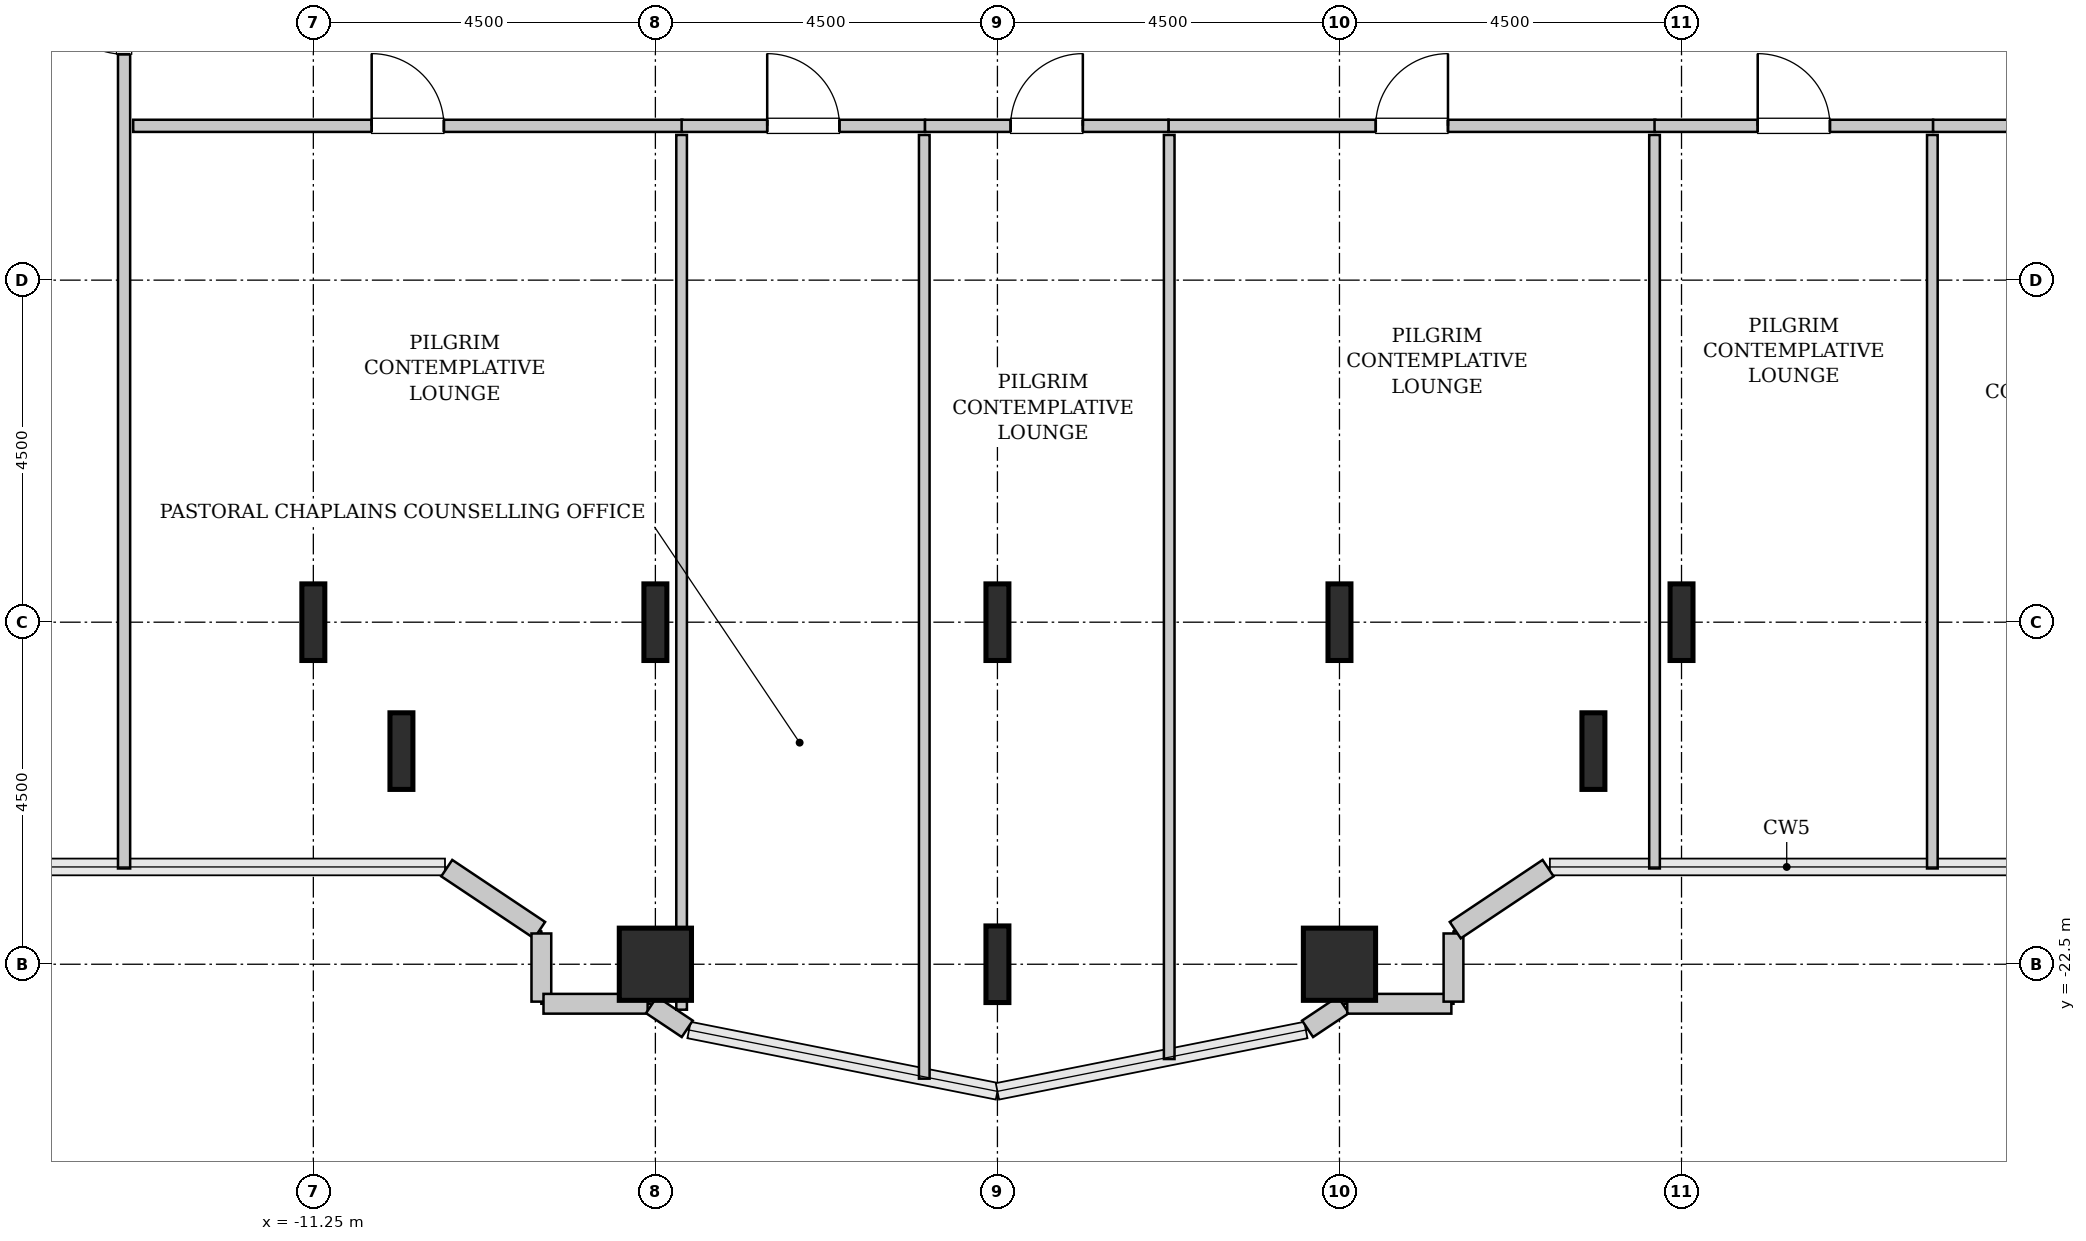
"""IFC4 building model, lengths in metres.
Left out: names, types, materials, properties, quantities, classifications, styles, units other than length and angle.
Written with IfcOpenShell. Run it as: python <this file> out.ifc"""

import sys

from ifc_helpers import new_model, si_unit, direction, frame, frame_2d, origin, origin_2d, place, context, subcontext, project, spatial, rectangle, hollow_rectangle, i_section, extrude, source, transform, mapped, element, fill, save


model = new_model("IFC4")
c1 = context("Model", 3, precision=1e-05, world=origin(), true_north=direction((0.0, 1.0)))
c2 = subcontext(c1, "Body", "Model", "MODEL_VIEW")
j1 = project(units=[si_unit("LENGTHUNIT", "METRE"), si_unit("PLANEANGLEUNIT", "RADIAN")], contexts=[c1])
p1 = place(None, origin())
s1 = spatial("IfcSite", under=j1, at=p1, CompositionType="ELEMENT")
p2 = place(p1, origin())
s2 = spatial("IfcBuilding", under=s1, at=p2, CompositionType="ELEMENT")
p3 = place(p2, frame((0.0, 0.0, 71.0)))
s3 = spatial("IfcBuildingStorey", under=s2, at=p3, CompositionType="ELEMENT", Elevation=71.0)
m1 = source(origin(), c2, "Body", "SweptSolid", [
    extrude(i_section(OverallWidth=0.302, OverallDepth=1.008, WebThickness=0.021, FlangeThickness=0.04, FilletRadius=0.03, at=origin_2d()), origin(), (0.0, 0.0, 1.0), 3.8),
])
for number, where, z_axis, x_axis in (
    (1, (-11.25, -18.0, 0.0), (0.0, 0.0, 1.0), (1.0, 0.0, 0.0)),
    (2, (-10.091, -19.696, 0.0), (0.0, 0.0, 1.0), (1.0, 0.0, 0.0)),
):
    element("IfcColumn", number, at=place(p3, frame(where, z_axis=z_axis, x_axis=x_axis)), inside=s3, PredefinedType="COLUMN", context=c2, shape_type="MappedRepresentation", body=[
        mapped(m1, transform((0.0, 0.0, 0.0), x_axis=(1.0, 0.0, 0.0), y_axis=(0.0, 1.0, 0.0), z_axis=(0.0, 0.0, 1.0), scale=1.0)),
    ])
m2 = source(origin(), c2, "Body", "SweptSolid", [
    extrude(hollow_rectangle(XDim=0.95, YDim=0.95, WallThickness=0.045, InnerFilletRadius=0.045, OuterFilletRadius=0.09, at=origin_2d()), origin(), (0.0, 0.0, 1.0), 3.8),
])
p4 = place(p3, frame((-6.75, -22.5, 0.0), z_axis=(0.0, 0.0, 1.0), x_axis=(1.0, 0.0, 0.0)))
e3 = element("IfcColumn", 3, at=p4, inside=s3, PredefinedType="COLUMN", context=c2, shape_type="MappedRepresentation", body=[
    mapped(m2, transform((0.0, 0.0, 0.0), x_axis=(1.0, 0.0, 0.0), y_axis=(0.0, 1.0, 0.0), z_axis=(0.0, 0.0, 1.0), scale=1.0)),
])
for number, where, z_axis, x_axis in (
    (4, (-6.75, -18.0, 0.0), (0.0, 0.0, 1.0), (1.0, 0.0, 0.0)),
    (5, (-2.25, -22.5, 0.0), (0.0, 0.0, 1.0), (1.0, 0.0, 0.0)),
    (6, (-2.25, -18.0, 0.0), (0.0, 0.0, 1.0), (1.0, 0.0, 0.0)),
):
    element("IfcColumn", number, at=place(p3, frame(where, z_axis=z_axis, x_axis=x_axis)), inside=s3, PredefinedType="COLUMN", context=c2, shape_type="MappedRepresentation", body=[
        mapped(m1, transform((0.0, 0.0, 0.0), x_axis=(1.0, 0.0, 0.0), y_axis=(0.0, 1.0, 0.0), z_axis=(0.0, 0.0, 1.0), scale=1.0)),
    ])
p5 = place(p3, frame((2.25, -22.5, 0.0), z_axis=(0.0, 0.0, 1.0), x_axis=(1.0, 0.0, 0.0)))
e7 = element("IfcColumn", 7, at=p5, inside=s3, PredefinedType="COLUMN", context=c2, shape_type="MappedRepresentation", body=[
    mapped(m2, transform((0.0, 0.0, 0.0), x_axis=(1.0, 0.0, 0.0), y_axis=(0.0, 1.0, 0.0), z_axis=(0.0, 0.0, 1.0), scale=1.0)),
])
for number, where, z_axis, x_axis in (
    (8, (2.25, -18.0, 0.0), (0.0, 0.0, 1.0), (1.0, 0.0, 0.0)),
    (9, (5.591, -19.696, 0.0), (0.0, 0.0, 1.0), (1.0, 0.0, 0.0)),
    (10, (6.75, -18.0, 0.0), (0.0, 0.0, 1.0), (1.0, 0.0, 0.0)),
):
    element("IfcColumn", number, at=place(p3, frame(where, z_axis=z_axis, x_axis=x_axis)), inside=s3, PredefinedType="COLUMN", context=c2, shape_type="MappedRepresentation", body=[
        mapped(m1, transform((0.0, 0.0, 0.0), x_axis=(1.0, 0.0, 0.0), y_axis=(0.0, 1.0, 0.0), z_axis=(0.0, 0.0, 1.0), scale=1.0)),
    ])
m3 = source(origin(), c2, "Body", "SweptSolid", [
    extrude(rectangle(XDim=1.469, YDim=0.26, at=frame_2d((0.734, 0.0))), origin(), (0.0, 0.0, 1.0), 3.55),
])
p6 = place(p3, frame((-9.495, -21.236, 0.0), z_axis=(0.0, 0.0, 1.0), x_axis=(0.831461760506, -0.555581983884, 0.0)))
e11 = element("IfcWall", 11, at=p6, inside=s3, PredefinedType="SOLIDWALL", context=c2, shape_type="MappedRepresentation", body=[
    mapped(m3, transform((0.0, 0.0, 0.0), x_axis=(1.0, 0.0, 0.0), y_axis=(0.0, 1.0, 0.0), z_axis=(0.0, 0.0, 1.0), scale=1.0)),
])
m4 = source(origin(), c2, "Body", "SweptSolid", [
    extrude(rectangle(XDim=0.897, YDim=0.26, at=frame_2d((0.448, 0.0))), origin(), (0.0, 0.0, 1.0), 3.55),
])
p7 = place(p3, frame((-8.25, -22.095, 0.0), z_axis=(0.0, 0.0, 1.0), x_axis=(0.0, -1.0, 0.0)))
e12 = element("IfcWall", 12, at=p7, inside=s3, PredefinedType="SOLIDWALL", context=c2, shape_type="MappedRepresentation", body=[
    mapped(m4, transform((0.0, 0.0, 0.0), x_axis=(1.0, 0.0, 0.0), y_axis=(0.0, 1.0, 0.0), z_axis=(0.0, 0.0, 1.0), scale=1.0)),
])
m5 = source(origin(), c2, "Body", "SweptSolid", [
    extrude(rectangle(XDim=1.37, YDim=0.26, at=frame_2d((0.685, 0.0))), origin(), (0.0, 0.0, 1.0), 3.55),
])
p8 = place(p3, frame((-8.222, -23.02, 0.0), z_axis=(0.0, 0.0, 1.0), x_axis=(1.0, 0.0, 0.0)))
e13 = element("IfcWall", 13, at=p8, inside=s3, PredefinedType="SOLIDWALL", context=c2, shape_type="MappedRepresentation", body=[
    mapped(m5, transform((0.0, 0.0, 0.0), x_axis=(1.0, 0.0, 0.0), y_axis=(0.0, 1.0, 0.0), z_axis=(0.0, 0.0, 1.0), scale=1.0)),
])
m6 = source(origin(), c2, "Body", "SweptSolid", [
    extrude(rectangle(XDim=0.565, YDim=0.26, at=frame_2d((0.283, 0.0))), origin(), (0.0, 0.0, 1.0), 3.55),
])
for number, where, z_axis, x_axis in (
    (14, (-6.801, -23.036, 0.0), (0.0, 0.0, 1.0), (0.832, -0.555, 0.0)),
    (15, (1.831, -23.35, 0.0), (0.0, 0.0, 1.0), (0.832, 0.555, 0.0)),
):
    element("IfcWall", number, at=place(p3, frame(where, z_axis=z_axis, x_axis=x_axis)), inside=s3, PredefinedType="SOLIDWALL", context=c2, shape_type="MappedRepresentation", body=[
        mapped(m6, transform((0.0, 0.0, 0.0), x_axis=(1.0, 0.0, 0.0), y_axis=(0.0, 1.0, 0.0), z_axis=(0.0, 0.0, 1.0), scale=1.0)),
    ])
p9 = place(p3, frame((2.352, -23.02, 0.0), z_axis=(0.0, 0.0, 1.0), x_axis=(1.0, 0.0, 0.0)))
e16 = element("IfcWall", 16, at=p9, inside=s3, PredefinedType="SOLIDWALL", context=c2, shape_type="MappedRepresentation", body=[
    mapped(m5, transform((0.0, 0.0, 0.0), x_axis=(1.0, 0.0, 0.0), y_axis=(0.0, 1.0, 0.0), z_axis=(0.0, 0.0, 1.0), scale=1.0)),
])
p10 = place(p3, frame((3.75, -22.992, 0.0), z_axis=(0.0, 0.0, 1.0), x_axis=(0.0, 1.0, 0.0)))
e17 = element("IfcWall", 17, at=p10, inside=s3, PredefinedType="SOLIDWALL", context=c2, shape_type="MappedRepresentation", body=[
    mapped(m4, transform((0.0, 0.0, 0.0), x_axis=(1.0, 0.0, 0.0), y_axis=(0.0, 1.0, 0.0), z_axis=(0.0, 0.0, 1.0), scale=1.0)),
])
p11 = place(p3, frame((3.773, -22.052, 0.0), z_axis=(0.0, 0.0, 1.0), x_axis=(0.831461760506, 0.555581983884, 0.0)))
e18 = element("IfcWall", 18, at=p11, inside=s3, PredefinedType="SOLIDWALL", context=c2, shape_type="MappedRepresentation", body=[
    mapped(m3, transform((0.0, 0.0, 0.0), x_axis=(1.0, 0.0, 0.0), y_axis=(0.0, 1.0, 0.0), z_axis=(0.0, 0.0, 1.0), scale=1.0)),
])
m7 = source(origin(), c2, "Body", "SweptSolid", [
    extrude(rectangle(XDim=12.645, YDim=0.16, at=frame_2d((6.323, 0.0))), origin(), (0.0, 0.0, 1.0), 3.535),
])
p12 = place(p3, frame((-13.74, -21.24, 0.0), z_axis=(0.0, 0.0, 1.0), x_axis=(0.0, 1.0, 0.0)))
e19 = element("IfcWall", 19, at=p12, inside=s3, PredefinedType="PARTITIONING", context=c2, shape_type="MappedRepresentation", body=[
    mapped(m7, transform((0.0, 0.0, 0.0), x_axis=(1.0, 0.0, 0.0), y_axis=(0.0, 1.0, 0.0), z_axis=(0.0, 0.0, 1.0), scale=1.0)),
])
p13 = place(p12, frame((10.712, 0.0, 0.0)))
e20 = element("IfcOpeningElement", 20, at=p13, cuts=e19, PredefinedType="OPENING", context=c2, shape_type="SweptSolid", body=[
    extrude(rectangle(XDim=0.95, YDim=2.1, at=frame_2d((0.475, 1.05))), frame((0.0, 0.09, 0.0), z_axis=(0.0, -1.0, 0.0), x_axis=(1.0, 0.0, 0.0)), (0.0, 0.0, 1.0), 0.18),
])
m8 = source(origin(), c2, "Body", "SweptSolid", [
    extrude(rectangle(XDim=7.225, YDim=0.16, at=frame_2d((3.613, 0.0))), origin(), (0.0, 0.0, 1.0), 3.535),
])
p14 = place(p3, frame((-13.62, -11.47, 0.0), z_axis=(0.0, 0.0, 1.0), x_axis=(1.0, 0.0, 0.0)))
e21 = element("IfcWall", 21, at=p14, inside=s3, PredefinedType="PARTITIONING", context=c2, shape_type="MappedRepresentation", body=[
    mapped(m8, transform((0.0, 0.0, 0.0), x_axis=(1.0, 0.0, 0.0), y_axis=(0.0, 1.0, 0.0), z_axis=(0.0, 0.0, 1.0), scale=1.0)),
])
p15 = place(p14, frame((3.137, 0.0, 0.0)))
e22 = element("IfcOpeningElement", 22, at=p15, cuts=e21, PredefinedType="OPENING", context=c2, shape_type="SweptSolid", body=[
    extrude(rectangle(XDim=0.95, YDim=2.1, at=frame_2d((0.475, 1.05))), frame((0.0, 0.09, 0.0), z_axis=(0.0, -1.0, 0.0), x_axis=(1.0, 0.0, 0.0)), (0.0, 0.0, 1.0), 0.18),
])
m9 = source(origin(), c2, "Body", "SweptSolid", [
    extrude(rectangle(XDim=11.508, YDim=0.14, at=frame_2d((5.754, 0.0))), origin(), (0.0, 0.0, 1.0), 2.825),
])
p16 = place(p3, frame((-6.405, -23.098, 0.0), z_axis=(0.0, 0.0, 1.0), x_axis=(0.0, 1.0, 0.0)))
e23 = element("IfcWall", 23, at=p16, inside=s3, PredefinedType="PARTITIONING", context=c2, shape_type="MappedRepresentation", body=[
    mapped(m9, transform((0.0, 0.0, 0.0), x_axis=(1.0, 0.0, 0.0), y_axis=(0.0, 1.0, 0.0), z_axis=(0.0, 0.0, 1.0), scale=1.0)),
])
m10 = source(origin(), c2, "Body", "SweptSolid", [
    extrude(rectangle(XDim=6.405, YDim=0.16, at=frame_2d((3.203, 0.0))), origin(), (0.0, 0.0, 1.0), 3.535),
])
p17 = place(p3, frame((0.0, -11.47, 0.0), z_axis=(0.0, 0.0, 1.0), x_axis=(1.0, 0.0, 0.0)))
e24 = element("IfcWall", 24, at=p17, inside=s3, PredefinedType="PARTITIONING", context=c2, shape_type="MappedRepresentation", body=[
    mapped(m10, transform((0.0, 0.0, 0.0), x_axis=(1.0, 0.0, 0.0), y_axis=(0.0, 1.0, 0.0), z_axis=(0.0, 0.0, 1.0), scale=1.0)),
])
p18 = place(p17, frame((2.728, 0.0, 0.0)))
e25 = element("IfcOpeningElement", 25, at=p18, cuts=e24, PredefinedType="OPENING", context=c2, shape_type="SweptSolid", body=[
    extrude(rectangle(XDim=0.95, YDim=2.1, at=frame_2d((0.475, 1.05))), frame((0.0, 0.09, 0.0), z_axis=(0.0, -1.0, 0.0), x_axis=(1.0, 0.0, 0.0)), (0.0, 0.0, 1.0), 0.18),
])
m11 = source(origin(), c2, "Body", "SweptSolid", [
    extrude(rectangle(XDim=12.157, YDim=0.14, at=frame_2d((6.079, 0.0))), origin(), (0.0, 0.0, 1.0), 3.535),
])
p19 = place(p3, frame((0.01, -23.747, 0.0), z_axis=(0.0, 0.0, 1.0), x_axis=(0.0, 1.0, 0.0)))
e26 = element("IfcWall", 26, at=p19, inside=s3, PredefinedType="PARTITIONING", context=c2, shape_type="MappedRepresentation", body=[
    mapped(m11, transform((0.0, 0.0, 0.0), x_axis=(1.0, 0.0, 0.0), y_axis=(0.0, 1.0, 0.0), z_axis=(0.0, 0.0, 1.0), scale=1.0)),
])
m12 = source(origin(), c2, "Body", "SweptSolid", [
    extrude(rectangle(XDim=9.65, YDim=0.14, at=frame_2d((4.825, 0.0))), origin(), (0.0, 0.0, 1.0), 3.535),
])
p20 = place(p3, frame((6.395, -21.24, 0.0), z_axis=(0.0, 0.0, 1.0), x_axis=(0.0, 1.0, 0.0)))
e27 = element("IfcWall", 27, at=p20, inside=s3, PredefinedType="PARTITIONING", context=c2, shape_type="MappedRepresentation", body=[
    mapped(m12, transform((0.0, 0.0, 0.0), x_axis=(1.0, 0.0, 0.0), y_axis=(0.0, 1.0, 0.0), z_axis=(0.0, 0.0, 1.0), scale=1.0)),
])
m13 = source(origin(), c2, "Body", "SweptSolid", [
    extrude(rectangle(XDim=3.203, YDim=0.16, at=frame_2d((1.601, 0.0))), origin(), (0.0, 0.0, 1.0), 3.535),
])
p21 = place(p3, frame((-6.405, -11.47, 0.0), z_axis=(0.0, 0.0, 1.0), x_axis=(1.0, 0.0, 0.0)))
e28 = element("IfcWall", 28, at=p21, inside=s3, PredefinedType="PARTITIONING", context=c2, shape_type="MappedRepresentation", body=[
    mapped(m13, transform((0.0, 0.0, 0.0), x_axis=(1.0, 0.0, 0.0), y_axis=(0.0, 1.0, 0.0), z_axis=(0.0, 0.0, 1.0), scale=1.0)),
])
p22 = place(p21, frame((1.126, 0.0, 0.0)))
e29 = element("IfcOpeningElement", 29, at=p22, cuts=e28, PredefinedType="OPENING", context=c2, shape_type="SweptSolid", body=[
    extrude(rectangle(XDim=0.95, YDim=2.1, at=frame_2d((0.475, 1.05))), frame((0.0, 0.09, 0.0), z_axis=(0.0, -1.0, 0.0), x_axis=(1.0, 0.0, 0.0)), (0.0, 0.0, 1.0), 0.18),
])
m14 = source(origin(), c2, "Body", "SweptSolid", [
    extrude(rectangle(XDim=12.415, YDim=0.14, at=frame_2d((6.208, 0.0))), origin(), (0.0, 0.0, 1.0), 3.535),
])
p23 = place(p3, frame((-3.212, -24.005, 0.0), z_axis=(0.0, 0.0, 1.0), x_axis=(0.0, 1.0, 0.0)))
e30 = element("IfcWall", 30, at=p23, inside=s3, PredefinedType="PARTITIONING", context=c2, shape_type="MappedRepresentation", body=[
    mapped(m14, transform((0.0, 0.0, 0.0), x_axis=(1.0, 0.0, 0.0), y_axis=(0.0, 1.0, 0.0), z_axis=(0.0, 0.0, 1.0), scale=1.0)),
])
m15 = source(origin(), c2, "Body", "SweptSolid", [
    extrude(rectangle(XDim=3.202, YDim=0.16, at=frame_2d((1.601, 0.0))), origin(), (0.0, 0.0, 1.0), 3.535),
])
p24 = place(p3, frame((-3.202, -11.47, 0.0), z_axis=(0.0, 0.0, 1.0), x_axis=(1.0, 0.0, 0.0)))
e31 = element("IfcWall", 31, at=p24, inside=s3, PredefinedType="PARTITIONING", context=c2, shape_type="MappedRepresentation", body=[
    mapped(m15, transform((0.0, 0.0, 0.0), x_axis=(1.0, 0.0, 0.0), y_axis=(0.0, 1.0, 0.0), z_axis=(0.0, 0.0, 1.0), scale=1.0)),
])
p25 = place(p24, frame((1.126, 0.0, 0.0)))
e32 = element("IfcOpeningElement", 32, at=p25, cuts=e31, PredefinedType="OPENING", context=c2, shape_type="SweptSolid", body=[
    extrude(rectangle(XDim=0.95, YDim=2.1, at=frame_2d((0.475, 1.05))), frame((0.0, 0.09, 0.0), z_axis=(0.0, -1.0, 0.0), x_axis=(1.0, 0.0, 0.0)), (0.0, 0.0, 1.0), 0.18),
])
m16 = source(origin(), c2, "Body", "SweptSolid", [
    extrude(rectangle(XDim=3.665, YDim=0.16, at=frame_2d((1.833, 0.0))), origin(), (0.0, 0.0, 1.0), 3.535),
])
p26 = place(p3, frame((6.395, -11.47, 0.0), z_axis=(0.0, 0.0, 1.0), x_axis=(1.0, 0.0, 0.0)))
e33 = element("IfcWall", 33, at=p26, inside=s3, PredefinedType="PARTITIONING", context=c2, shape_type="MappedRepresentation", body=[
    mapped(m16, transform((0.0, 0.0, 0.0), x_axis=(1.0, 0.0, 0.0), y_axis=(0.0, 1.0, 0.0), z_axis=(0.0, 0.0, 1.0), scale=1.0)),
])
p27 = place(p26, frame((1.357, 0.0, 0.0)))
e34 = element("IfcOpeningElement", 34, at=p27, cuts=e33, PredefinedType="OPENING", context=c2, shape_type="SweptSolid", body=[
    extrude(rectangle(XDim=0.95, YDim=2.1, at=frame_2d((0.475, 1.05))), frame((0.0, 0.09, 0.0), z_axis=(0.0, -1.0, 0.0), x_axis=(1.0, 0.0, 0.0)), (0.0, 0.0, 1.0), 0.18),
])
p28 = place(p3, frame((10.05, -21.24, 0.0), z_axis=(0.0, 0.0, 1.0), x_axis=(0.0, 1.0, 0.0)))
e35 = element("IfcWall", 35, at=p28, inside=s3, PredefinedType="PARTITIONING", context=c2, shape_type="MappedRepresentation", body=[
    mapped(m12, transform((0.0, 0.0, 0.0), x_axis=(1.0, 0.0, 0.0), y_axis=(0.0, 1.0, 0.0), z_axis=(0.0, 0.0, 1.0), scale=1.0)),
])
m17 = source(origin(), c2, "Body", "SweptSolid", [
    extrude(rectangle(XDim=3.56, YDim=0.16, at=frame_2d((1.78, 0.0))), origin(), (0.0, 0.0, 1.0), 3.535),
])
p29 = place(p3, frame((10.06, -11.47, 0.0), z_axis=(0.0, 0.0, 1.0), x_axis=(1.0, 0.0, 0.0)))
e36 = element("IfcWall", 36, at=p29, inside=s3, PredefinedType="PARTITIONING", context=c2, shape_type="MappedRepresentation", body=[
    mapped(m17, transform((0.0, 0.0, 0.0), x_axis=(1.0, 0.0, 0.0), y_axis=(0.0, 1.0, 0.0), z_axis=(0.0, 0.0, 1.0), scale=1.0)),
])
p30 = place(p29, frame((1.305, 0.0, 0.0)))
e37 = element("IfcOpeningElement", 37, at=p30, cuts=e36, PredefinedType="OPENING", context=c2, shape_type="SweptSolid", body=[
    extrude(rectangle(XDim=0.95, YDim=2.1, at=frame_2d((0.475, 1.05))), frame((0.0, 0.09, 0.0), z_axis=(0.0, -1.0, 0.0), x_axis=(1.0, 0.0, 0.0)), (0.0, 0.0, 1.0), 0.18),
])
m18 = source(origin(), c2, "Body", "SweptSolid", [
    extrude(rectangle(XDim=0.95, YDim=2.1, at=frame_2d((0.475, 1.05))), frame((0.0, 0.025, 0.0), z_axis=(0.0, -1.0, 0.0), x_axis=(1.0, 0.0, 0.0)), (0.0, 0.0, 1.0), 0.05),
])
p31 = place(p13, origin())
e38 = element("IfcDoor", 38, at=p31, inside=s3, OperationType="SINGLE_SWING_RIGHT", PredefinedType="DOOR", context=c2, shape_type="MappedRepresentation", body=[
    mapped(m18, transform((0.0, 0.0, 0.0), x_axis=(1.0, 0.0, 0.0), y_axis=(0.0, 1.0, 0.0), z_axis=(0.0, 0.0, 1.0), scale=1.0)),
])
fill(e20, e38)
p32 = place(p15, origin())
e39 = element("IfcDoor", 39, at=p32, inside=s3, OperationType="SINGLE_SWING_LEFT", PredefinedType="DOOR", context=c2, shape_type="MappedRepresentation", body=[
    mapped(m18, transform((0.0, 0.0, 0.0), x_axis=(1.0, 0.0, 0.0), y_axis=(0.0, 1.0, 0.0), z_axis=(0.0, 0.0, 1.0), scale=1.0)),
])
fill(e22, e39)
p33 = place(p18, origin())
e40 = element("IfcDoor", 40, at=p33, inside=s3, OperationType="SINGLE_SWING_RIGHT", PredefinedType="DOOR", context=c2, shape_type="MappedRepresentation", body=[
    mapped(m18, transform((0.0, 0.0, 0.0), x_axis=(1.0, 0.0, 0.0), y_axis=(0.0, 1.0, 0.0), z_axis=(0.0, 0.0, 1.0), scale=1.0)),
])
fill(e25, e40)
p34 = place(p22, origin())
e41 = element("IfcDoor", 41, at=p34, inside=s3, OperationType="SINGLE_SWING_LEFT", PredefinedType="DOOR", context=c2, shape_type="MappedRepresentation", body=[
    mapped(m18, transform((0.0, 0.0, 0.0), x_axis=(1.0, 0.0, 0.0), y_axis=(0.0, 1.0, 0.0), z_axis=(0.0, 0.0, 1.0), scale=1.0)),
])
fill(e29, e41)
p35 = place(p25, origin())
e42 = element("IfcDoor", 42, at=p35, inside=s3, OperationType="SINGLE_SWING_RIGHT", PredefinedType="DOOR", context=c2, shape_type="MappedRepresentation", body=[
    mapped(m18, transform((0.0, 0.0, 0.0), x_axis=(1.0, 0.0, 0.0), y_axis=(0.0, 1.0, 0.0), z_axis=(0.0, 0.0, 1.0), scale=1.0)),
])
fill(e32, e42)
p36 = place(p27, origin())
e43 = element("IfcDoor", 43, at=p36, inside=s3, OperationType="SINGLE_SWING_LEFT", PredefinedType="DOOR", context=c2, shape_type="MappedRepresentation", body=[
    mapped(m18, transform((0.0, 0.0, 0.0), x_axis=(1.0, 0.0, 0.0), y_axis=(0.0, 1.0, 0.0), z_axis=(0.0, 0.0, 1.0), scale=1.0)),
])
fill(e34, e43)
save(model, sys.argv[1])
